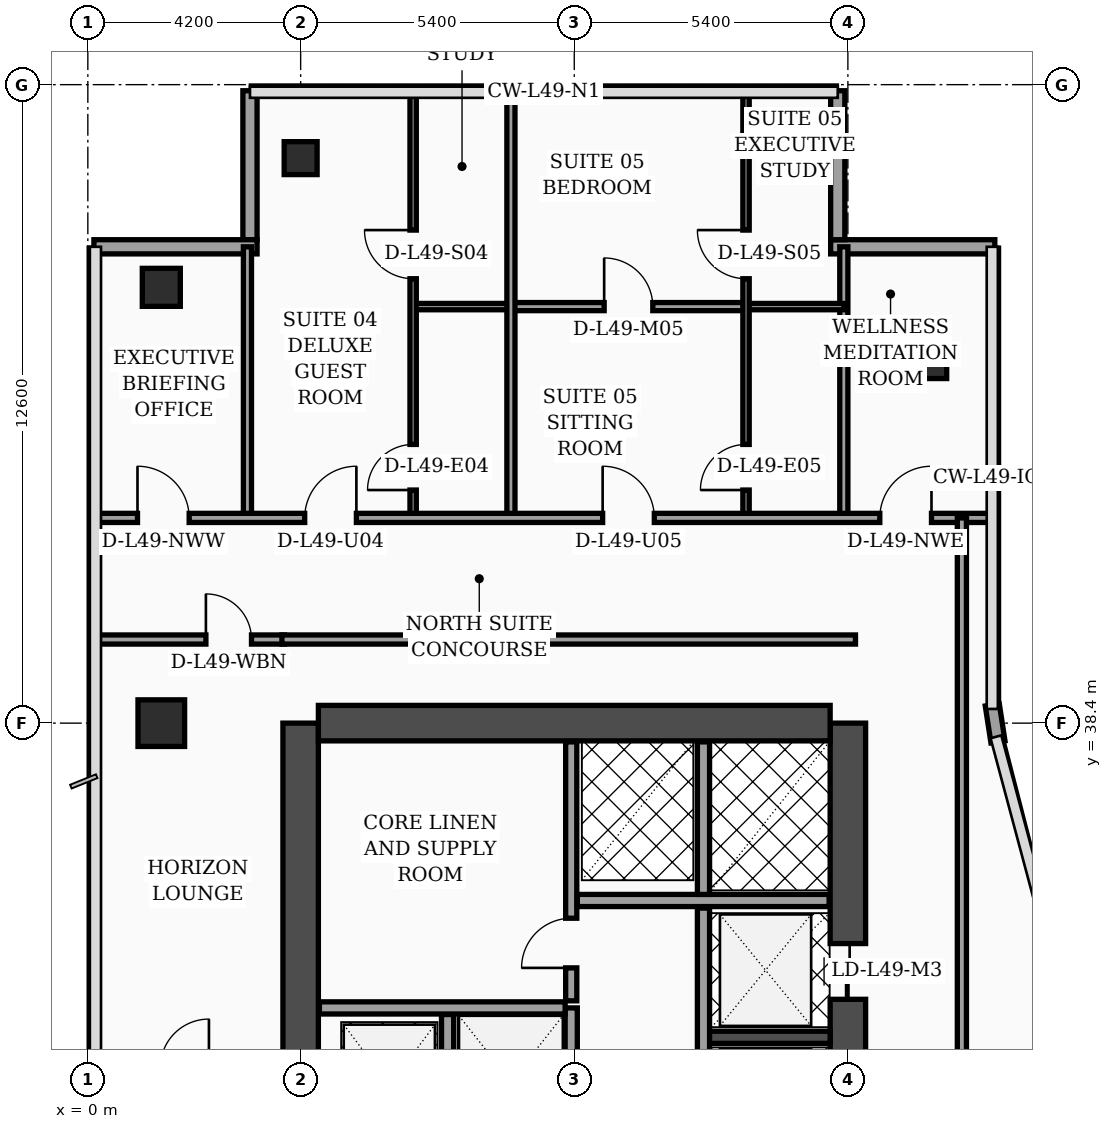
"""IFC4 building model, lengths in metres.
Left out: names, types, materials, properties, quantities, classifications, styles, units other than length and angle.
Written with IfcOpenShell. Run it as: python <this file> out.ifc"""

import sys

from ifc_helpers import new_model, si_unit, direction, frame, frame_2d, origin, origin_2d, place, context, subcontext, project, spatial, rectangle, hollow_rectangle, extrude, element, fill, save


model = new_model("IFC4")
c1 = context("Model", 3, precision=1e-05, world=origin(), true_north=direction((0.0, 1.0)))
c2 = subcontext(c1, "Body", "Model", "MODEL_VIEW")
j1 = project(units=[si_unit("LENGTHUNIT", "METRE"), si_unit("PLANEANGLEUNIT", "RADIAN")], contexts=[c1])
p1 = place(None, origin())
s1 = spatial("IfcSite", under=j1, at=p1, CompositionType="ELEMENT")
p2 = place(p1, origin())
s2 = spatial("IfcBuilding", under=s1, at=p2, CompositionType="ELEMENT")
p3 = place(p2, frame((0.0, 0.0, 199.6)))
s3 = spatial("IfcBuildingStorey", under=s2, at=p3, CompositionType="ELEMENT", Elevation=199.6)
p4 = place(p3, frame((4.2, 16.8, 0.0), z_axis=(0.0, 0.0, 1.0), x_axis=(0.0, 1.0, 0.0)))
e1 = element("IfcWall", 1, at=p4, inside=s3, PredefinedType="SHEAR", context=c2, shape_type="SweptSolid", body=[
    extrude(rectangle(XDim=21.6, YDim=0.7, at=frame_2d((10.8, 0.0))), origin(), (0.0, 0.0, 1.0), 3.56),
])
p5 = place(p3, frame((15.0, 16.8, 0.0), z_axis=(0.0, 0.0, 1.0), x_axis=(0.0, 1.0, 0.0)))
e2 = element("IfcWall", 2, at=p5, inside=s3, PredefinedType="SHEAR", context=c2, shape_type="SweptSolid", body=[
    extrude(rectangle(XDim=21.6, YDim=0.7, at=frame_2d((10.8, 0.0))), origin(), (0.0, 0.0, 1.0), 3.56),
])
p6 = place(p5, frame((8.65, 0.0, 0.0)))
e3 = element("IfcOpeningElement", 3, at=p6, cuts=e2, PredefinedType="OPENING", context=c2, shape_type="SweptSolid", body=[
    extrude(rectangle(XDim=1.1, YDim=2.2, at=frame_2d((0.55, 1.1))), frame((0.0, 0.36, 0.0), z_axis=(0.0, -1.0, 0.0), x_axis=(1.0, 0.0, 0.0)), (0.0, 0.0, 1.0), 0.72),
])
p7 = place(p5, frame((10.85, 0.0, 0.0)))
e4 = element("IfcOpeningElement", 4, at=p7, cuts=e2, PredefinedType="OPENING", context=c2, shape_type="SweptSolid", body=[
    extrude(rectangle(XDim=1.1, YDim=2.2, at=frame_2d((0.55, 1.1))), frame((0.0, 0.36, 0.0), z_axis=(0.0, -1.0, 0.0), x_axis=(1.0, 0.0, 0.0)), (0.0, 0.0, 1.0), 0.72),
])
p8 = place(p5, frame((13.5, 0.0, 0.0)))
e5 = element("IfcOpeningElement", 5, at=p8, cuts=e2, PredefinedType="OPENING", context=c2, shape_type="SweptSolid", body=[
    extrude(rectangle(XDim=1.1, YDim=2.2, at=frame_2d((0.55, 1.1))), frame((0.0, 0.36, 0.0), z_axis=(0.0, -1.0, 0.0), x_axis=(1.0, 0.0, 0.0)), (0.0, 0.0, 1.0), 0.72),
])
p9 = place(p5, frame((16.15, 0.0, 0.0)))
e6 = element("IfcOpeningElement", 6, at=p9, cuts=e2, PredefinedType="OPENING", context=c2, shape_type="SweptSolid", body=[
    extrude(rectangle(XDim=1.1, YDim=2.2, at=frame_2d((0.55, 1.1))), frame((0.0, 0.36, 0.0), z_axis=(0.0, -1.0, 0.0), x_axis=(1.0, 0.0, 0.0)), (0.0, 0.0, 1.0), 0.72),
])
p10 = place(p3, frame((4.55, 38.4, 0.0), z_axis=(0.0, 0.0, 1.0), x_axis=(1.0, 0.0, 0.0)))
e7 = element("IfcWall", 7, at=p10, inside=s3, PredefinedType="SHEAR", context=c2, shape_type="SweptSolid", body=[
    extrude(rectangle(XDim=10.1, YDim=0.7, at=frame_2d((5.05, 0.0))), origin(), (0.0, 0.0, 1.0), 3.56),
])
p11 = place(p3, frame((12.18, 32.2, 0.0), z_axis=(0.0, 0.0, 1.0), x_axis=(1.0, 0.0, 0.0)))
e8 = element("IfcWall", 8, at=p11, inside=s3, PredefinedType="SOLIDWALL", context=c2, shape_type="SweptSolid", body=[
    extrude(rectangle(XDim=2.47, YDim=0.24, at=frame_2d((1.235, 0.0))), origin(), (0.0, 0.0, 1.0), 3.56),
])
p12 = place(p3, frame((1.45, 38.4, 0.0), z_axis=(0.0, 0.0, 1.0), x_axis=(1.0, 0.0, 0.0)))
e9 = element("IfcColumn", 9, at=p12, inside=s3, PredefinedType="COLUMN", context=c2, shape_type="SweptSolid", body=[
    extrude(rectangle(XDim=0.92, YDim=0.92, at=origin_2d()), origin(), (0.0, 0.0, 1.0), 3.56),
])
p13 = place(p3, frame((1.45, 47.0, 0.0), z_axis=(0.0, 0.0, 1.0), x_axis=(1.0, 0.0, 0.0)))
e10 = element("IfcColumn", 10, at=p13, inside=s3, PredefinedType="COLUMN", context=c2, shape_type="SweptSolid", body=[
    extrude(hollow_rectangle(XDim=0.75, YDim=0.75, WallThickness=0.032, at=origin_2d()), origin(), (0.0, 0.0, 1.0), 3.56),
])
p14 = place(p3, frame((4.2, 49.55, 0.0), z_axis=(0.0, 0.0, 1.0), x_axis=(1.0, 0.0, 0.0)))
e11 = element("IfcColumn", 11, at=p14, inside=s3, PredefinedType="COLUMN", context=c2, shape_type="SweptSolid", body=[
    extrude(hollow_rectangle(XDim=0.65, YDim=0.65, WallThickness=0.028, at=origin_2d()), origin(), (0.0, 0.0, 1.0), 3.56),
])
p15 = place(p3, frame((16.55, 45.6, 0.0), z_axis=(0.0, 0.0, 1.0), x_axis=(1.0, 0.0, 0.0)))
e12 = element("IfcColumn", 12, at=p15, inside=s3, PredefinedType="COLUMN", context=c2, shape_type="SweptSolid", body=[
    extrude(rectangle(XDim=0.8, YDim=0.8, at=origin_2d()), origin(), (0.0, 0.0, 1.0), 3.56),
])
p16 = place(p3, frame((17.962, 38.03, 0.0), z_axis=(0.0, 0.0, 1.0), x_axis=(-0.15141125477, 0.988470855377, 0.0)))
e13 = element("IfcWall", 13, at=p16, inside=s3, PredefinedType="SOLIDWALL", context=c2, shape_type="SweptSolid", body=[
    extrude(rectangle(XDim=0.739, YDim=0.28, at=frame_2d((0.369, 0.0))), origin(), (0.0, 0.0, 1.0), 3.56),
])
p17 = place(p3, frame((17.9, 47.8, 0.0), z_axis=(0.0, 0.0, 1.0), x_axis=(-1.0, 0.0, 0.0)))
e14 = element("IfcWall", 14, at=p17, inside=s3, PredefinedType="SOLIDWALL", context=c2, shape_type="SweptSolid", body=[
    extrude(rectangle(XDim=3.24, YDim=0.28, at=frame_2d((1.62, 0.0))), origin(), (0.0, 0.0, 1.0), 3.56),
])
p18 = place(p3, frame((14.8, 47.94, 0.0), z_axis=(0.0, 0.0, 1.0), x_axis=(0.0, 1.0, 0.0)))
e15 = element("IfcWall", 15, at=p18, inside=s3, PredefinedType="SOLIDWALL", context=c2, shape_type="SweptSolid", body=[
    extrude(rectangle(XDim=2.94, YDim=0.28, at=frame_2d((1.47, 0.0))), origin(), (0.0, 0.0, 1.0), 3.56),
])
p19 = place(p3, frame((3.2, 50.88, 0.0), z_axis=(0.0, 0.0, 1.0), x_axis=(0.0, -1.0, 0.0)))
e16 = element("IfcWall", 16, at=p19, inside=s3, PredefinedType="SOLIDWALL", context=c2, shape_type="SweptSolid", body=[
    extrude(rectangle(XDim=2.94, YDim=0.28, at=frame_2d((1.47, 0.0))), origin(), (0.0, 0.0, 1.0), 3.09),
])
p20 = place(p3, frame((3.34, 47.8, 0.0), z_axis=(0.0, 0.0, 1.0), x_axis=(-1.0, 0.0, 0.0)))
e17 = element("IfcWall", 17, at=p20, inside=s3, PredefinedType="SOLIDWALL", context=c2, shape_type="SweptSolid", body=[
    extrude(rectangle(XDim=3.22, YDim=0.28, at=frame_2d((1.61, 0.0))), origin(), (0.0, 0.0, 1.0), 3.09),
])
p21 = place(p3, frame((7.1, 30.02, 0.0), z_axis=(0.0, 0.0, 1.0), x_axis=(0.0, 1.0, 0.0)))
e18 = element("IfcWall", 18, at=p21, inside=s3, PredefinedType="SOLIDWALL", context=c2, shape_type="SweptSolid", body=[
    extrude(rectangle(XDim=2.63, YDim=0.24, at=frame_2d((1.315, 0.0))), origin(), (0.0, 0.0, 1.0), 3.56),
])
p22 = place(p3, frame((9.54, 29.88, 0.0), z_axis=(0.0, 0.0, 1.0), x_axis=(0.0, 1.0, 0.0)))
e19 = element("IfcWall", 19, at=p22, inside=s3, PredefinedType="SOLIDWALL", context=c2, shape_type="SweptSolid", body=[
    extrude(rectangle(XDim=2.9, YDim=0.24, at=frame_2d((1.45, 0.0))), origin(), (0.0, 0.0, 1.0), 3.56),
])
p23 = place(p22, frame((0.7, 0.0, 0.0)))
e20 = element("IfcOpeningElement", 20, at=p23, cuts=e19, PredefinedType="OPENING", context=c2, shape_type="SweptSolid", body=[
    extrude(rectangle(XDim=1.3, YDim=2.35, at=frame_2d((0.65, 1.175))), frame((0.0, 0.13, 0.0), z_axis=(0.0, -1.0, 0.0), x_axis=(1.0, 0.0, 0.0)), (0.0, 0.0, 1.0), 0.26),
])
p24 = place(p3, frame((4.57, 32.78, 0.0), z_axis=(0.0, 0.0, 1.0), x_axis=(1.0, 0.0, 0.0)))
e21 = element("IfcWall", 21, at=p24, inside=s3, PredefinedType="SOLIDWALL", context=c2, shape_type="SweptSolid", body=[
    extrude(rectangle(XDim=4.85, YDim=0.24, at=frame_2d((2.425, 0.0))), origin(), (0.0, 0.0, 1.0), 3.19),
])
p25 = place(p3, frame((9.54, 32.92, 0.0), z_axis=(0.0, 0.0, 1.0), x_axis=(0.0, 1.0, 0.0)))
e22 = element("IfcWall", 22, at=p25, inside=s3, PredefinedType="SOLIDWALL", context=c2, shape_type="SweptSolid", body=[
    extrude(rectangle(XDim=5.11, YDim=0.22, at=frame_2d((2.555, 0.0))), origin(), (0.0, 0.0, 1.0), 3.56),
])
p26 = place(p25, frame((0.65, 0.0, 0.0)))
e23 = element("IfcOpeningElement", 23, at=p26, cuts=e22, PredefinedType="OPENING", context=c2, shape_type="SweptSolid", body=[
    extrude(rectangle(XDim=0.98, YDim=2.15, at=frame_2d((0.49, 1.075))), frame((0.0, 0.12, 0.0), z_axis=(0.0, -1.0, 0.0), x_axis=(1.0, 0.0, 0.0)), (0.0, 0.0, 1.0), 0.24),
])
p27 = place(p3, frame((12.15, 27.0, 0.0), z_axis=(0.0, 0.0, 1.0), x_axis=(0.0, 1.0, 0.0)))
e24 = element("IfcWall", 24, at=p27, inside=s3, PredefinedType="SOLIDWALL", context=c2, shape_type="SweptSolid", body=[
    extrude(rectangle(XDim=7.75, YDim=0.24, at=frame_2d((3.875, 0.0))), origin(), (0.0, 0.0, 1.0), 3.56),
])
p28 = place(p3, frame((9.66, 34.9, 0.0), z_axis=(0.0, 0.0, 1.0), x_axis=(1.0, 0.0, 0.0)))
e25 = element("IfcWall", 25, at=p28, inside=s3, PredefinedType="SOLIDWALL", context=c2, shape_type="SweptSolid", body=[
    extrude(rectangle(XDim=4.97, YDim=0.24, at=frame_2d((2.485, 0.0))), origin(), (0.0, 0.0, 1.0), 3.56),
])
p29 = place(p3, frame((12.15, 35.02, 0.0), z_axis=(0.0, 0.0, 1.0), x_axis=(0.0, 1.0, 0.0)))
e26 = element("IfcWall", 26, at=p29, inside=s3, PredefinedType="SOLIDWALL", context=c2, shape_type="SweptSolid", body=[
    extrude(rectangle(XDim=3.01, YDim=0.24, at=frame_2d((1.505, 0.0))), origin(), (0.0, 0.0, 1.0), 3.56),
])
p30 = place(p3, frame((0.08, 40.05, 0.0), z_axis=(0.0, 0.0, 1.0), x_axis=(1.0, 0.0, 0.0)))
e27 = element("IfcWall", 27, at=p30, inside=s3, PredefinedType="PARTITIONING", context=c2, shape_type="SweptSolid", body=[
    extrude(rectangle(XDim=3.8, YDim=0.18, at=frame_2d((1.9, 0.0))), origin(), (0.0, 0.0, 1.0), 2.94),
])
p31 = place(p30, frame((2.25, 0.0, 0.0)))
e28 = element("IfcOpeningElement", 28, at=p31, cuts=e27, PredefinedType="OPENING", context=c2, shape_type="SweptSolid", body=[
    extrude(rectangle(XDim=0.9, YDim=2.15, at=frame_2d((0.45, 1.075))), frame((0.0, 0.1, 0.0), z_axis=(0.0, -1.0, 0.0), x_axis=(1.0, 0.0, 0.0)), (0.0, 0.0, 1.0), 0.2),
])
p32 = place(p3, frame((3.15, 42.45, 0.0), z_axis=(0.0, 0.0, 1.0), x_axis=(0.0, 1.0, 0.0)))
e29 = element("IfcWall", 29, at=p32, inside=s3, PredefinedType="PARTITIONING", context=c2, shape_type="SweptSolid", body=[
    extrude(rectangle(XDim=5.35, YDim=0.16, at=frame_2d((2.675, 0.0))), origin(), (0.0, 0.0, 1.0), 3.14),
])
p33 = place(p3, frame((14.92, 42.45, 0.0), z_axis=(0.0, 0.0, 1.0), x_axis=(0.0, 1.0, 0.0)))
e30 = element("IfcWall", 30, at=p33, inside=s3, PredefinedType="PARTITIONING", context=c2, shape_type="SweptSolid", body=[
    extrude(rectangle(XDim=5.35, YDim=0.16, at=frame_2d((2.675, 0.0))), origin(), (0.0, 0.0, 1.0), 3.09),
])
p34 = place(p3, frame((6.42, 46.62, 0.0), z_axis=(0.0, 0.0, 1.0), x_axis=(1.0, 0.0, 0.0)))
e31 = element("IfcWall", 31, at=p34, inside=s3, PredefinedType="PARTITIONING", context=c2, shape_type="SweptSolid", body=[
    extrude(rectangle(XDim=1.93, YDim=0.125, at=frame_2d((0.965, 0.0))), origin(), (0.0, 0.0, 1.0), 3.56),
])
p35 = place(p3, frame((6.42, 42.45, 0.0), z_axis=(0.0, 0.0, 1.0), x_axis=(0.0, 1.0, 0.0)))
e32 = element("IfcWall", 32, at=p35, inside=s3, PredefinedType="PARTITIONING", context=c2, shape_type="SweptSolid", body=[
    extrude(rectangle(XDim=8.49, YDim=0.125, at=frame_2d((4.245, 0.0))), origin(), (0.0, 0.0, 1.0), 3.09),
])
p36 = place(p35, frame((0.55, 0.0, 0.0)))
e33 = element("IfcOpeningElement", 33, at=p36, cuts=e32, PredefinedType="OPENING", context=c2, shape_type="SweptSolid", body=[
    extrude(rectangle(XDim=0.9, YDim=2.15, at=frame_2d((0.45, 1.075))), frame((0.0, 0.073, 0.0), z_axis=(0.0, -1.0, 0.0), x_axis=(1.0, 0.0, 0.0)), (0.0, 0.0, 1.0), 0.145),
])
p37 = place(p35, frame((4.72, 0.0, 0.0)))
e34 = element("IfcOpeningElement", 34, at=p37, cuts=e32, PredefinedType="OPENING", context=c2, shape_type="SweptSolid", body=[
    extrude(rectangle(XDim=0.96, YDim=2.2, at=frame_2d((0.48, 1.1))), frame((0.0, 0.073, 0.0), z_axis=(0.0, -1.0, 0.0), x_axis=(1.0, 0.0, 0.0)), (0.0, 0.0, 1.0), 0.145),
])
p38 = place(p3, frame((12.99, 46.62, 0.0), z_axis=(0.0, 0.0, 1.0), x_axis=(1.0, 0.0, 0.0)))
e35 = element("IfcWall", 35, at=p38, inside=s3, PredefinedType="PARTITIONING", context=c2, shape_type="SweptSolid", body=[
    extrude(rectangle(XDim=1.93, YDim=0.125, at=frame_2d((0.965, 0.0))), origin(), (0.0, 0.0, 1.0), 3.09),
])
p39 = place(p3, frame((8.35, 46.62, 0.0), z_axis=(0.0, 0.0, 1.0), x_axis=(1.0, 0.0, 0.0)))
e36 = element("IfcWall", 36, at=p39, inside=s3, PredefinedType="PARTITIONING", context=c2, shape_type="SweptSolid", body=[
    extrude(rectangle(XDim=4.64, YDim=0.16, at=frame_2d((2.32, 0.0))), origin(), (0.0, 0.0, 1.0), 3.09),
])
p40 = place(p39, frame((1.84, 0.0, 0.0)))
e37 = element("IfcOpeningElement", 37, at=p40, cuts=e36, PredefinedType="OPENING", context=c2, shape_type="SweptSolid", body=[
    extrude(rectangle(XDim=0.96, YDim=2.2, at=frame_2d((0.48, 1.1))), frame((0.0, 0.09, 0.0), z_axis=(0.0, -1.0, 0.0), x_axis=(1.0, 0.0, 0.0)), (0.0, 0.0, 1.0), 0.18),
])
p41 = place(p3, frame((12.99, 42.45, 0.0), z_axis=(0.0, 0.0, 1.0), x_axis=(0.0, 1.0, 0.0)))
e38 = element("IfcWall", 38, at=p41, inside=s3, PredefinedType="PARTITIONING", context=c2, shape_type="SweptSolid", body=[
    extrude(rectangle(XDim=8.49, YDim=0.125, at=frame_2d((4.245, 0.0))), origin(), (0.0, 0.0, 1.0), 3.09),
])
p42 = place(p41, frame((0.55, 0.0, 0.0)))
e39 = element("IfcOpeningElement", 39, at=p42, cuts=e38, PredefinedType="OPENING", context=c2, shape_type="SweptSolid", body=[
    extrude(rectangle(XDim=0.9, YDim=2.15, at=frame_2d((0.45, 1.075))), frame((0.0, 0.073, 0.0), z_axis=(0.0, -1.0, 0.0), x_axis=(1.0, 0.0, 0.0)), (0.0, 0.0, 1.0), 0.145),
])
p43 = place(p41, frame((4.72, 0.0, 0.0)))
e40 = element("IfcOpeningElement", 40, at=p43, cuts=e38, PredefinedType="OPENING", context=c2, shape_type="SweptSolid", body=[
    extrude(rectangle(XDim=0.96, YDim=2.2, at=frame_2d((0.48, 1.1))), frame((0.0, 0.073, 0.0), z_axis=(0.0, -1.0, 0.0), x_axis=(1.0, 0.0, 0.0)), (0.0, 0.0, 1.0), 0.145),
])
p44 = place(p3, frame((8.35, 42.45, 0.0), z_axis=(0.0, 0.0, 1.0), x_axis=(0.0, 1.0, 0.0)))
e41 = element("IfcWall", 41, at=p44, inside=s3, PredefinedType="PARTITIONING", context=c2, shape_type="SweptSolid", body=[
    extrude(rectangle(XDim=8.49, YDim=0.16, at=frame_2d((4.245, 0.0))), origin(), (0.0, 0.0, 1.0), 3.09),
])
p45 = place(p3, frame((0.08, 42.45, 0.0), z_axis=(0.0, 0.0, 1.0), x_axis=(1.0, 0.0, 0.0)))
e42 = element("IfcWall", 42, at=p45, inside=s3, PredefinedType="PARTITIONING", context=c2, shape_type="SweptSolid", body=[
    extrude(rectangle(XDim=17.77, YDim=0.18, at=frame_2d((8.885, 0.0))), origin(), (0.0, 0.0, 1.0), 2.94),
])
p46 = place(p45, frame((0.9, 0.0, 0.0)))
e43 = element("IfcOpeningElement", 43, at=p46, cuts=e42, PredefinedType="OPENING", context=c2, shape_type="SweptSolid", body=[
    extrude(rectangle(XDim=1.02, YDim=2.2, at=frame_2d((0.51, 1.1))), frame((0.0, 0.1, 0.0), z_axis=(0.0, -1.0, 0.0), x_axis=(1.0, 0.0, 0.0)), (0.0, 0.0, 1.0), 0.2),
])
p47 = place(p45, frame((4.2, 0.0, 0.0)))
e44 = element("IfcOpeningElement", 44, at=p47, cuts=e42, PredefinedType="OPENING", context=c2, shape_type="SweptSolid", body=[
    extrude(rectangle(XDim=1.02, YDim=2.2, at=frame_2d((0.51, 1.1))), frame((0.0, 0.1, 0.0), z_axis=(0.0, -1.0, 0.0), x_axis=(1.0, 0.0, 0.0)), (0.0, 0.0, 1.0), 0.2),
])
p48 = place(p45, frame((10.08, 0.0, 0.0)))
e45 = element("IfcOpeningElement", 45, at=p48, cuts=e42, PredefinedType="OPENING", context=c2, shape_type="SweptSolid", body=[
    extrude(rectangle(XDim=1.02, YDim=2.2, at=frame_2d((0.51, 1.1))), frame((0.0, 0.1, 0.0), z_axis=(0.0, -1.0, 0.0), x_axis=(1.0, 0.0, 0.0)), (0.0, 0.0, 1.0), 0.2),
])
p49 = place(p45, frame((15.55, 0.0, 0.0)))
e46 = element("IfcOpeningElement", 46, at=p49, cuts=e42, PredefinedType="OPENING", context=c2, shape_type="SweptSolid", body=[
    extrude(rectangle(XDim=1.02, YDim=2.2, at=frame_2d((0.51, 1.1))), frame((0.0, 0.1, 0.0), z_axis=(0.0, -1.0, 0.0), x_axis=(1.0, 0.0, 0.0)), (0.0, 0.0, 1.0), 0.2),
])
p50 = place(p3, frame((17.25, 24.3, 0.0), z_axis=(0.0, 0.0, 1.0), x_axis=(0.0, 1.0, 0.0)))
e47 = element("IfcWall", 47, at=p50, inside=s3, PredefinedType="PARTITIONING", context=c2, shape_type="SweptSolid", body=[
    extrude(rectangle(XDim=18.15, YDim=0.18, at=frame_2d((9.075, 0.0))), origin(), (0.0, 0.0, 1.0), 2.94),
])
p51 = place(p3, frame((3.83, 40.05, 0.0), z_axis=(0.0, 0.0, 1.0), x_axis=(1.0, 0.0, 0.0)))
e48 = element("IfcWall", 48, at=p51, inside=s3, PredefinedType="PARTITIONING", context=c2, shape_type="SweptSolid", body=[
    extrude(rectangle(XDim=11.32, YDim=0.18, at=frame_2d((5.66, 0.0))), origin(), (0.0, 0.0, 1.0), 2.94),
])
p52 = place(p26, origin())
e49 = element("IfcDoor", 49, at=p52, inside=s3, OperationType="SINGLE_SWING_LEFT", PredefinedType="DOOR", context=c2, shape_type="SweptSolid", body=[
    extrude(rectangle(XDim=0.98, YDim=2.15, at=frame_2d((0.49, 1.075))), frame((0.0, 0.025, 0.0), z_axis=(0.0, -1.0, 0.0), x_axis=(1.0, 0.0, 0.0)), (0.0, 0.0, 1.0), 0.05),
])
fill(e23, e49)
p53 = place(p31, origin())
e50 = element("IfcDoor", 50, at=p53, inside=s3, OperationType="SINGLE_SWING_LEFT", PredefinedType="DOOR", context=c2, shape_type="SweptSolid", body=[
    extrude(rectangle(XDim=0.9, YDim=2.15, at=frame_2d((0.45, 1.075))), frame((0.0, 0.025, 0.0), z_axis=(0.0, -1.0, 0.0), x_axis=(1.0, 0.0, 0.0)), (0.0, 0.0, 1.0), 0.05),
])
fill(e28, e50)
p54 = place(p36, origin())
e51 = element("IfcDoor", 51, at=p54, inside=s3, OperationType="SINGLE_SWING_LEFT", PredefinedType="DOOR", context=c2, shape_type="SweptSolid", body=[
    extrude(rectangle(XDim=0.9, YDim=2.15, at=frame_2d((0.45, 1.075))), frame((0.0, 0.025, 0.0), z_axis=(0.0, -1.0, 0.0), x_axis=(1.0, 0.0, 0.0)), (0.0, 0.0, 1.0), 0.05),
])
fill(e33, e51)
p55 = place(p37, origin())
e52 = element("IfcDoor", 52, at=p55, inside=s3, OperationType="SINGLE_SWING_RIGHT", PredefinedType="DOOR", context=c2, shape_type="SweptSolid", body=[
    extrude(rectangle(XDim=0.96, YDim=2.2, at=frame_2d((0.48, 1.1))), frame((0.0, 0.025, 0.0), z_axis=(0.0, -1.0, 0.0), x_axis=(1.0, 0.0, 0.0)), (0.0, 0.0, 1.0), 0.05),
])
fill(e34, e52)
p56 = place(p40, origin())
e53 = element("IfcDoor", 53, at=p56, inside=s3, OperationType="SINGLE_SWING_LEFT", PredefinedType="DOOR", context=c2, shape_type="SweptSolid", body=[
    extrude(rectangle(XDim=0.96, YDim=2.2, at=frame_2d((0.48, 1.1))), frame((0.0, 0.025, 0.0), z_axis=(0.0, -1.0, 0.0), x_axis=(1.0, 0.0, 0.0)), (0.0, 0.0, 1.0), 0.05),
])
fill(e37, e53)
p57 = place(p42, origin())
e54 = element("IfcDoor", 54, at=p57, inside=s3, OperationType="SINGLE_SWING_LEFT", PredefinedType="DOOR", context=c2, shape_type="SweptSolid", body=[
    extrude(rectangle(XDim=0.9, YDim=2.15, at=frame_2d((0.45, 1.075))), frame((0.0, 0.025, 0.0), z_axis=(0.0, -1.0, 0.0), x_axis=(1.0, 0.0, 0.0)), (0.0, 0.0, 1.0), 0.05),
])
fill(e39, e54)
p58 = place(p43, origin())
e55 = element("IfcDoor", 55, at=p58, inside=s3, OperationType="SINGLE_SWING_RIGHT", PredefinedType="DOOR", context=c2, shape_type="SweptSolid", body=[
    extrude(rectangle(XDim=0.96, YDim=2.2, at=frame_2d((0.48, 1.1))), frame((0.0, 0.025, 0.0), z_axis=(0.0, -1.0, 0.0), x_axis=(1.0, 0.0, 0.0)), (0.0, 0.0, 1.0), 0.05),
])
fill(e40, e55)
p59 = place(p46, origin())
e56 = element("IfcDoor", 56, at=p59, inside=s3, OperationType="SINGLE_SWING_LEFT", PredefinedType="DOOR", context=c2, shape_type="SweptSolid", body=[
    extrude(rectangle(XDim=1.02, YDim=2.2, at=frame_2d((0.51, 1.1))), frame((0.0, 0.025, 0.0), z_axis=(0.0, -1.0, 0.0), x_axis=(1.0, 0.0, 0.0)), (0.0, 0.0, 1.0), 0.05),
])
fill(e43, e56)
p60 = place(p47, origin())
e57 = element("IfcDoor", 57, at=p60, inside=s3, OperationType="SINGLE_SWING_RIGHT", PredefinedType="DOOR", context=c2, shape_type="SweptSolid", body=[
    extrude(rectangle(XDim=1.02, YDim=2.2, at=frame_2d((0.51, 1.1))), frame((0.0, 0.025, 0.0), z_axis=(0.0, -1.0, 0.0), x_axis=(1.0, 0.0, 0.0)), (0.0, 0.0, 1.0), 0.05),
])
fill(e44, e57)
p61 = place(p48, origin())
e58 = element("IfcDoor", 58, at=p61, inside=s3, OperationType="SINGLE_SWING_LEFT", PredefinedType="DOOR", context=c2, shape_type="SweptSolid", body=[
    extrude(rectangle(XDim=1.02, YDim=2.2, at=frame_2d((0.51, 1.1))), frame((0.0, 0.025, 0.0), z_axis=(0.0, -1.0, 0.0), x_axis=(1.0, 0.0, 0.0)), (0.0, 0.0, 1.0), 0.05),
])
fill(e45, e58)
p62 = place(p49, origin())
e59 = element("IfcDoor", 59, at=p62, inside=s3, OperationType="SINGLE_SWING_RIGHT", PredefinedType="DOOR", context=c2, shape_type="SweptSolid", body=[
    extrude(rectangle(XDim=1.02, YDim=2.2, at=frame_2d((0.51, 1.1))), frame((0.0, 0.025, 0.0), z_axis=(0.0, -1.0, 0.0), x_axis=(1.0, 0.0, 0.0)), (0.0, 0.0, 1.0), 0.05),
])
fill(e46, e59)
p63 = place(p9, origin())
e60 = element("IfcDoor", 60, at=p63, inside=s3, OperationType="DOUBLE_DOOR_SLIDING", PredefinedType="DOOR", context=c2, shape_type="SweptSolid", body=[
    extrude(rectangle(XDim=1.1, YDim=2.2, at=frame_2d((0.55, 1.1))), frame((0.0, 0.025, 0.0), z_axis=(0.0, -1.0, 0.0), x_axis=(1.0, 0.0, 0.0)), (0.0, 0.0, 1.0), 0.05),
])
fill(e6, e60)
save(model, sys.argv[1])
